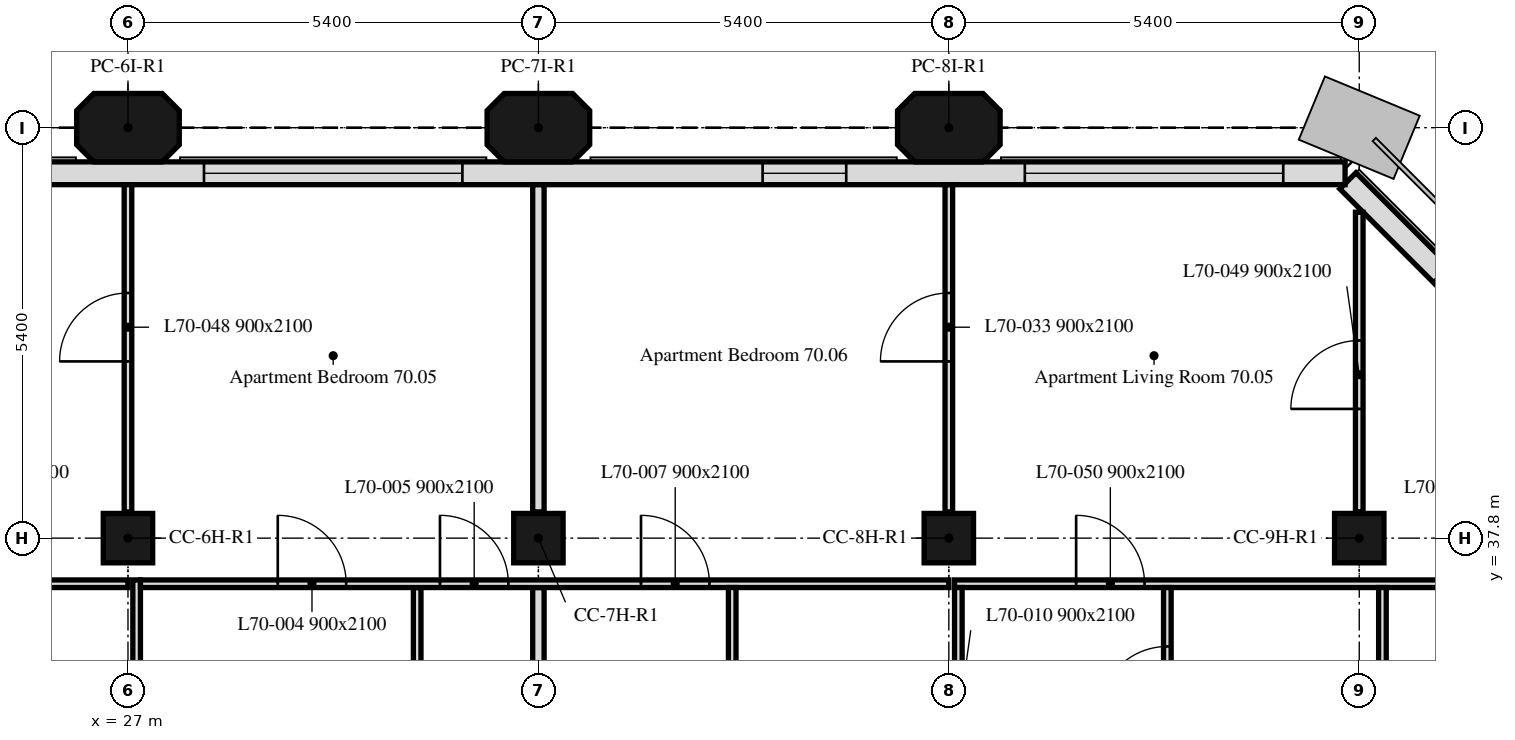
"""IFC4 building model, lengths in metres.
Left out: names, types, materials, properties, quantities, classifications, styles, units other than length and angle.
Written with IfcOpenShell. Run it as: python <this file> out.ifc"""

import sys

from ifc_helpers import new_model, si_unit, direction, frame, frame_2d, origin, origin_2d, place, context, subcontext, project, spatial, polyline, rectangle, outline, extrude, element, fill, save


model = new_model("IFC4")
c1 = context("Model", 3, precision=1e-05, world=origin(), true_north=direction((0.0, 1.0)))
c2 = subcontext(c1, "Body", "Model", "MODEL_VIEW")
j1 = project(units=[si_unit("LENGTHUNIT", "METRE"), si_unit("PLANEANGLEUNIT", "RADIAN")], contexts=[c1])
p1 = place(None, origin())
s1 = spatial("IfcSite", under=j1, at=p1, CompositionType="ELEMENT")
p2 = place(p1, origin())
s2 = spatial("IfcBuilding", under=s1, at=p2, CompositionType="ELEMENT")
p3 = place(p2, frame((0.0, 0.0, 285.1)))
s3 = spatial("IfcBuildingStorey", under=s2, at=p3, CompositionType="ELEMENT", Elevation=285.1)
for number, where, z_axis, x_axis in (
    (1, (27.0, 37.8, 0.0), (0.0, 0.0, 1.0), (1.0, 0.0, 0.0)),
    (2, (32.4, 37.8, 0.0), (0.0, 0.0, 1.0), (1.0, 0.0, 0.0)),
    (3, (37.8, 37.8, 0.0), (0.0, 0.0, 1.0), (1.0, 0.0, 0.0)),
    (4, (43.2, 37.8, 0.0), (0.0, 0.0, 1.0), (1.0, 0.0, 0.0)),
):
    element("IfcColumn", number, at=place(p3, frame(where, z_axis=z_axis, x_axis=x_axis)), inside=s3, PredefinedType="COLUMN", context=c2, shape_type="SweptSolid", body=[
        extrude(rectangle(XDim=0.65, YDim=0.65, at=origin_2d()), origin(), (0.0, 0.0, 1.0), 3.0),
    ])
for number, where, z_axis, x_axis in (
    (5, (27.0, 43.2, 0.0), (0.0, 0.0, 1.0), (1.0, 0.0, 0.0)),
    (6, (32.4, 43.2, 0.0), (0.0, 0.0, 1.0), (1.0, 0.0, 0.0)),
    (7, (37.8, 43.2, 0.0), (0.0, 0.0, 1.0), (1.0, 0.0, 0.0)),
):
    element("IfcColumn", number, at=place(p3, frame(where, z_axis=z_axis, x_axis=x_axis)), inside=s3, PredefinedType="COLUMN", context=c2, shape_type="SweptSolid", body=[
        extrude(outline(polyline([(-0.45, -0.45), (0.45, -0.45), (0.675, -0.225), (0.675, 0.225), (0.45, 0.45), (-0.45, 0.45), (-0.675, 0.225), (-0.675, -0.225), (-0.45, -0.45)])), origin(), (0.0, 0.0, 1.0), 3.0),
    ])
p4 = place(p3, frame((47.901, 37.65, 0.0), z_axis=(0.0, 0.0, 1.0), x_axis=(-0.707106781187, 0.707106781187, 0.0)))
e8 = element("IfcWall", 8, at=p4, inside=s3, PredefinedType="SOLIDWALL", context=c2, shape_type="SweptSolid", body=[
    extrude(rectangle(XDim=6.86, YDim=0.3, at=frame_2d((3.43, 0.0))), origin(), (0.0, 0.0, 1.0), 3.0),
])
p5 = place(p4, frame((1.73, 0.0, 0.9)))
e9 = element("IfcOpeningElement", 9, at=p5, cuts=e8, PredefinedType="OPENING", context=c2, shape_type="SweptSolid", body=[
    extrude(rectangle(XDim=3.4, YDim=1.7, at=frame_2d((1.7, 0.85))), frame((0.0, 0.16, 0.0), z_axis=(0.0, -1.0, 0.0), x_axis=(1.0, 0.0, 0.0)), (0.0, 0.0, 1.0), 0.32),
])
p6 = place(p3, frame((43.014, 42.6, 0.0), z_axis=(0.0, 0.0, 1.0), x_axis=(-1.0, 0.0, 0.0)))
e10 = element("IfcWall", 10, at=p6, inside=s3, PredefinedType="SOLIDWALL", context=c2, shape_type="SweptSolid", body=[
    extrude(rectangle(XDim=32.027, YDim=0.3, at=frame_2d((16.014, 0.0))), origin(), (0.0, 0.0, 1.0), 3.0),
])
p7 = place(p6, frame((0.814, 0.0, 0.9)))
e11 = element("IfcOpeningElement", 11, at=p7, cuts=e10, PredefinedType="OPENING", context=c2, shape_type="SweptSolid", body=[
    extrude(rectangle(XDim=3.4, YDim=1.7, at=frame_2d((1.7, 0.85))), frame((0.0, 0.16, 0.0), z_axis=(0.0, -1.0, 0.0), x_axis=(1.0, 0.0, 0.0)), (0.0, 0.0, 1.0), 0.32),
])
p8 = place(p6, frame((6.564, 0.0, 0.9)))
e12 = element("IfcOpeningElement", 12, at=p8, cuts=e10, PredefinedType="OPENING", context=c2, shape_type="SweptSolid", body=[
    extrude(rectangle(XDim=1.1, YDim=1.7, at=frame_2d((0.55, 0.85))), frame((0.0, 0.16, 0.0), z_axis=(0.0, -1.0, 0.0), x_axis=(1.0, 0.0, 0.0)), (0.0, 0.0, 1.0), 0.32),
])
p9 = place(p6, frame((11.614, 0.0, 0.9)))
e13 = element("IfcOpeningElement", 13, at=p9, cuts=e10, PredefinedType="OPENING", context=c2, shape_type="SweptSolid", body=[
    extrude(rectangle(XDim=3.4, YDim=1.7, at=frame_2d((1.7, 0.85))), frame((0.0, 0.16, 0.0), z_axis=(0.0, -1.0, 0.0), x_axis=(1.0, 0.0, 0.0)), (0.0, 0.0, 1.0), 0.32),
])
p10 = place(p6, frame((17.364, 0.0, 0.9)))
e14 = element("IfcOpeningElement", 14, at=p10, cuts=e10, PredefinedType="OPENING", context=c2, shape_type="SweptSolid", body=[
    extrude(rectangle(XDim=1.1, YDim=1.7, at=frame_2d((0.55, 0.85))), frame((0.0, 0.16, 0.0), z_axis=(0.0, -1.0, 0.0), x_axis=(1.0, 0.0, 0.0)), (0.0, 0.0, 1.0), 0.32),
])
p11 = place(p6, frame((22.414, 0.0, 0.9)))
e15 = element("IfcOpeningElement", 15, at=p11, cuts=e10, PredefinedType="OPENING", context=c2, shape_type="SweptSolid", body=[
    extrude(rectangle(XDim=3.4, YDim=1.7, at=frame_2d((1.7, 0.85))), frame((0.0, 0.16, 0.0), z_axis=(0.0, -1.0, 0.0), x_axis=(1.0, 0.0, 0.0)), (0.0, 0.0, 1.0), 0.32),
])
p12 = place(p6, frame((28.164, 0.0, 0.9)))
e16 = element("IfcOpeningElement", 16, at=p12, cuts=e10, PredefinedType="OPENING", context=c2, shape_type="SweptSolid", body=[
    extrude(rectangle(XDim=1.1, YDim=1.7, at=frame_2d((0.55, 0.85))), frame((0.0, 0.16, 0.0), z_axis=(0.0, -1.0, 0.0), x_axis=(1.0, 0.0, 0.0)), (0.0, 0.0, 1.0), 0.32),
])
p13 = place(p3, frame((10.8, 37.2, 0.0), z_axis=(0.0, 0.0, 1.0), x_axis=(1.0, 0.0, 0.0)))
e17 = element("IfcWall", 17, at=p13, inside=s3, PredefinedType="PARTITIONING", context=c2, shape_type="SweptSolid", body=[
    extrude(rectangle(XDim=16.2, YDim=0.1, at=frame_2d((8.1, 0.0))), origin(), (0.0, 0.0, 1.0), 2.4),
])
p14 = place(p13, frame((2.995, 0.0, 0.0)))
e18 = element("IfcOpeningElement", 18, at=p14, cuts=e17, PredefinedType="OPENING", context=c2, shape_type="SweptSolid", body=[
    extrude(rectangle(XDim=0.9, YDim=2.1, at=frame_2d((0.45, 1.05))), frame((0.0, 0.05, 0.0), z_axis=(0.0, -1.0, 0.0), x_axis=(1.0, 0.0, 0.0)), (0.0, 0.0, 1.0), 0.1),
])
p15 = place(p13, frame((13.996, 0.0, 0.0)))
e19 = element("IfcOpeningElement", 19, at=p15, cuts=e17, PredefinedType="OPENING", context=c2, shape_type="SweptSolid", body=[
    extrude(rectangle(XDim=0.9, YDim=2.1, at=frame_2d((0.45, 1.05))), frame((0.0, 0.05, 0.0), z_axis=(0.0, -1.0, 0.0), x_axis=(1.0, 0.0, 0.0)), (0.0, 0.0, 1.0), 0.1),
])
p16 = place(p13, frame((6.928, 0.0, 0.0)))
e20 = element("IfcOpeningElement", 20, at=p16, cuts=e17, PredefinedType="OPENING", context=c2, shape_type="SweptSolid", body=[
    extrude(rectangle(XDim=0.9, YDim=2.1, at=frame_2d((0.45, 1.05))), frame((0.0, 0.05, 0.0), z_axis=(0.0, -1.0, 0.0), x_axis=(1.0, 0.0, 0.0)), (0.0, 0.0, 1.0), 0.1),
])
p17 = place(p13, frame((8.428, 0.0, 0.0)))
e21 = element("IfcOpeningElement", 21, at=p17, cuts=e17, PredefinedType="OPENING", context=c2, shape_type="SweptSolid", body=[
    extrude(rectangle(XDim=0.9, YDim=2.1, at=frame_2d((0.45, 1.05))), frame((0.0, 0.05, 0.0), z_axis=(0.0, -1.0, 0.0), x_axis=(1.0, 0.0, 0.0)), (0.0, 0.0, 1.0), 0.1),
])
p18 = place(p3, frame((27.0, 38.145, 0.0), z_axis=(0.0, 0.0, 1.0), x_axis=(0.0, 1.0, 0.0)))
e22 = element("IfcWall", 22, at=p18, inside=s3, PredefinedType="PARTITIONING", context=c2, shape_type="SweptSolid", body=[
    extrude(rectangle(XDim=4.304, YDim=0.1, at=frame_2d((2.152, 0.0))), origin(), (0.0, 0.0, 1.0), 2.4),
])
p19 = place(p18, frame((1.98, 0.0, 0.0)))
e23 = element("IfcOpeningElement", 23, at=p19, cuts=e22, PredefinedType="OPENING", context=c2, shape_type="SweptSolid", body=[
    extrude(rectangle(XDim=0.9, YDim=2.1, at=frame_2d((0.45, 1.05))), frame((0.0, 0.05, 0.0), z_axis=(0.0, -1.0, 0.0), x_axis=(1.0, 0.0, 0.0)), (0.0, 0.0, 1.0), 0.1),
])
p20 = place(p3, frame((32.4, 38.145, 0.0), z_axis=(0.0, 0.0, 1.0), x_axis=(0.0, 1.0, 0.0)))
e24 = element("IfcWall", 24, at=p20, inside=s3, PredefinedType="PARTITIONING", context=c2, shape_type="SweptSolid", body=[
    extrude(rectangle(XDim=4.304, YDim=0.15, at=frame_2d((2.152, 0.0))), origin(), (0.0, 0.0, 1.0), 2.4),
])
p21 = place(p3, frame((27.114, 34.725, 0.0), z_axis=(0.0, 0.0, 1.0), x_axis=(0.0, 1.0, 0.0)))
e25 = element("IfcWall", 25, at=p21, inside=s3, PredefinedType="PARTITIONING", context=c2, shape_type="SweptSolid", body=[
    extrude(rectangle(XDim=2.525, YDim=0.1, at=frame_2d((1.262, 0.0))), origin(), (0.0, 0.0, 1.0), 2.4),
])
p22 = place(p3, frame((30.805, 34.725, 0.0), z_axis=(0.0, 0.0, 1.0), x_axis=(0.0, 1.0, 0.0)))
e26 = element("IfcWall", 26, at=p22, inside=s3, PredefinedType="PARTITIONING", context=c2, shape_type="SweptSolid", body=[
    extrude(rectangle(XDim=2.425, YDim=0.1, at=frame_2d((1.212, 0.0))), origin(), (0.0, 0.0, 1.0), 3.0),
])
p23 = place(p3, frame((32.4, 34.725, 0.0), z_axis=(0.0, 0.0, 1.0), x_axis=(0.0, 1.0, 0.0)))
e27 = element("IfcWall", 27, at=p23, inside=s3, PredefinedType="PARTITIONING", context=c2, shape_type="SweptSolid", body=[
    extrude(rectangle(XDim=2.425, YDim=0.15, at=frame_2d((1.212, 0.0))), origin(), (0.0, 0.0, 1.0), 2.4),
])
p24 = place(p3, frame((27.164, 37.2, 0.0), z_axis=(0.0, 0.0, 1.0), x_axis=(1.0, 0.0, 0.0)))
e28 = element("IfcWall", 28, at=p24, inside=s3, PredefinedType="PARTITIONING", context=c2, shape_type="SweptSolid", body=[
    extrude(rectangle(XDim=10.636, YDim=0.1, at=frame_2d((5.318, 0.0))), origin(), (0.0, 0.0, 1.0), 2.4),
])
p25 = place(p24, frame((1.807, 0.0, 0.0)))
e29 = element("IfcOpeningElement", 29, at=p25, cuts=e28, PredefinedType="OPENING", context=c2, shape_type="SweptSolid", body=[
    extrude(rectangle(XDim=0.9, YDim=2.1, at=frame_2d((0.45, 1.05))), frame((0.0, 0.05, 0.0), z_axis=(0.0, -1.0, 0.0), x_axis=(1.0, 0.0, 0.0)), (0.0, 0.0, 1.0), 0.1),
])
p26 = place(p24, frame((3.941, 0.0, 0.0)))
e30 = element("IfcOpeningElement", 30, at=p26, cuts=e28, PredefinedType="OPENING", context=c2, shape_type="SweptSolid", body=[
    extrude(rectangle(XDim=0.9, YDim=2.1, at=frame_2d((0.45, 1.05))), frame((0.0, 0.05, 0.0), z_axis=(0.0, -1.0, 0.0), x_axis=(1.0, 0.0, 0.0)), (0.0, 0.0, 1.0), 0.1),
])
p27 = place(p24, frame((6.586, 0.0, 0.0)))
e31 = element("IfcOpeningElement", 31, at=p27, cuts=e28, PredefinedType="OPENING", context=c2, shape_type="SweptSolid", body=[
    extrude(rectangle(XDim=0.9, YDim=2.1, at=frame_2d((0.45, 1.05))), frame((0.0, 0.05, 0.0), z_axis=(0.0, -1.0, 0.0), x_axis=(1.0, 0.0, 0.0)), (0.0, 0.0, 1.0), 0.1),
])
p28 = place(p3, frame((37.8, 38.145, 0.0), z_axis=(0.0, 0.0, 1.0), x_axis=(0.0, 1.0, 0.0)))
e32 = element("IfcWall", 32, at=p28, inside=s3, PredefinedType="PARTITIONING", context=c2, shape_type="SweptSolid", body=[
    extrude(rectangle(XDim=4.304, YDim=0.1, at=frame_2d((2.152, 0.0))), origin(), (0.0, 0.0, 1.0), 2.4),
])
p29 = place(p28, frame((1.98, 0.0, 0.0)))
e33 = element("IfcOpeningElement", 33, at=p29, cuts=e32, PredefinedType="OPENING", context=c2, shape_type="SweptSolid", body=[
    extrude(rectangle(XDim=0.9, YDim=2.1, at=frame_2d((0.45, 1.05))), frame((0.0, 0.05, 0.0), z_axis=(0.0, -1.0, 0.0), x_axis=(1.0, 0.0, 0.0)), (0.0, 0.0, 1.0), 0.1),
])
p30 = place(p3, frame((43.2, 38.145, 0.0), z_axis=(0.0, 0.0, 1.0), x_axis=(0.0, 1.0, 0.0)))
e34 = element("IfcWall", 34, at=p30, inside=s3, PredefinedType="PARTITIONING", context=c2, shape_type="SweptSolid", body=[
    extrude(rectangle(XDim=3.943, YDim=0.1, at=frame_2d((1.971, 0.0))), origin(), (0.0, 0.0, 1.0), 3.0),
])
p31 = place(p30, frame((1.355, 0.0, 0.0)))
e35 = element("IfcOpeningElement", 35, at=p31, cuts=e34, PredefinedType="OPENING", context=c2, shape_type="SweptSolid", body=[
    extrude(rectangle(XDim=0.9, YDim=2.1, at=frame_2d((0.45, 1.05))), frame((0.0, 0.05, 0.0), z_axis=(0.0, -1.0, 0.0), x_axis=(1.0, 0.0, 0.0)), (0.0, 0.0, 1.0), 0.1),
])
p32 = place(p3, frame((37.875, 37.2, 0.0), z_axis=(0.0, 0.0, 1.0), x_axis=(1.0, 0.0, 0.0)))
e36 = element("IfcWall", 36, at=p32, inside=s3, PredefinedType="PARTITIONING", context=c2, shape_type="SweptSolid", body=[
    extrude(rectangle(XDim=9.974, YDim=0.1, at=frame_2d((4.987, 0.0))), origin(), (0.0, 0.0, 1.0), 3.0),
])
p33 = place(p32, frame((7.165, 0.0, 0.0)))
e37 = element("IfcOpeningElement", 37, at=p33, cuts=e36, PredefinedType="OPENING", context=c2, shape_type="SweptSolid", body=[
    extrude(rectangle(XDim=0.9, YDim=2.1, at=frame_2d((0.45, 1.05))), frame((0.0, 0.05, 0.0), z_axis=(0.0, -1.0, 0.0), x_axis=(1.0, 0.0, 0.0)), (0.0, 0.0, 1.0), 0.1),
])
p34 = place(p32, frame((8.824, 0.0, 0.0)))
e38 = element("IfcOpeningElement", 38, at=p34, cuts=e36, PredefinedType="OPENING", context=c2, shape_type="SweptSolid", body=[
    extrude(rectangle(XDim=0.9, YDim=2.1, at=frame_2d((0.45, 1.05))), frame((0.0, 0.05, 0.0), z_axis=(0.0, -1.0, 0.0), x_axis=(1.0, 0.0, 0.0)), (0.0, 0.0, 1.0), 0.1),
])
p35 = place(p32, frame((1.6, 0.0, 0.0)))
e39 = element("IfcOpeningElement", 39, at=p35, cuts=e36, PredefinedType="OPENING", context=c2, shape_type="SweptSolid", body=[
    extrude(rectangle(XDim=0.9, YDim=2.1, at=frame_2d((0.45, 1.05))), frame((0.0, 0.05, 0.0), z_axis=(0.0, -1.0, 0.0), x_axis=(1.0, 0.0, 0.0)), (0.0, 0.0, 1.0), 0.1),
])
p36 = place(p3, frame((34.95, 34.725, 0.0), z_axis=(0.0, 0.0, 1.0), x_axis=(0.0, 1.0, 0.0)))
e40 = element("IfcWall", 40, at=p36, inside=s3, PredefinedType="PARTITIONING", context=c2, shape_type="SweptSolid", body=[
    extrude(rectangle(XDim=2.425, YDim=0.1, at=frame_2d((1.212, 0.0))), origin(), (0.0, 0.0, 1.0), 3.0),
])
p37 = place(p3, frame((37.925, 34.725, 0.0), z_axis=(0.0, 0.0, 1.0), x_axis=(0.0, 1.0, 0.0)))
e41 = element("IfcWall", 41, at=p37, inside=s3, PredefinedType="PARTITIONING", context=c2, shape_type="SweptSolid", body=[
    extrude(rectangle(XDim=2.425, YDim=0.1, at=frame_2d((1.212, 0.0))), origin(), (0.0, 0.0, 1.0), 2.4),
])
p38 = place(p37, frame((0.25, 0.0, 0.0)))
e42 = element("IfcOpeningElement", 42, at=p38, cuts=e41, PredefinedType="OPENING", context=c2, shape_type="SweptSolid", body=[
    extrude(rectangle(XDim=0.9, YDim=2.1, at=frame_2d((0.45, 1.05))), frame((0.0, 0.05, 0.0), z_axis=(0.0, -1.0, 0.0), x_axis=(1.0, 0.0, 0.0)), (0.0, 0.0, 1.0), 0.1),
])
p39 = place(p3, frame((40.675, 34.725, 0.0), z_axis=(0.0, 0.0, 1.0), x_axis=(0.0, 1.0, 0.0)))
e43 = element("IfcWall", 43, at=p39, inside=s3, PredefinedType="PARTITIONING", context=c2, shape_type="SweptSolid", body=[
    extrude(rectangle(XDim=2.425, YDim=0.1, at=frame_2d((1.212, 0.0))), origin(), (0.0, 0.0, 1.0), 3.0),
])
p40 = place(p39, frame((0.75, 0.0, 0.0)))
e44 = element("IfcOpeningElement", 44, at=p40, cuts=e43, PredefinedType="OPENING", context=c2, shape_type="SweptSolid", body=[
    extrude(rectangle(XDim=0.9, YDim=2.1, at=frame_2d((0.45, 1.05))), frame((0.0, 0.05, 0.0), z_axis=(0.0, -1.0, 0.0), x_axis=(1.0, 0.0, 0.0)), (0.0, 0.0, 1.0), 0.1),
])
p41 = place(p3, frame((43.505, 34.725, 0.0), z_axis=(0.0, 0.0, 1.0), x_axis=(0.0, 1.0, 0.0)))
e45 = element("IfcWall", 45, at=p41, inside=s3, PredefinedType="PARTITIONING", context=c2, shape_type="SweptSolid", body=[
    extrude(rectangle(XDim=2.425, YDim=0.1, at=frame_2d((1.212, 0.0))), origin(), (0.0, 0.0, 1.0), 3.0),
])
p42 = place(p7, origin())
e46 = element("IfcWindow", 46, at=p42, inside=s3, PartitioningType="SINGLE_PANEL", PredefinedType="WINDOW", context=c2, shape_type="SweptSolid", body=[
    extrude(rectangle(XDim=3.4, YDim=1.7, at=frame_2d((1.7, 0.85))), frame((0.0, 0.03, 0.0), z_axis=(0.0, -1.0, 0.0), x_axis=(1.0, 0.0, 0.0)), (0.0, 0.0, 1.0), 0.06),
])
fill(e11, e46)
p43 = place(p8, origin())
e47 = element("IfcWindow", 47, at=p43, inside=s3, PartitioningType="SINGLE_PANEL", PredefinedType="WINDOW", context=c2, shape_type="SweptSolid", body=[
    extrude(rectangle(XDim=1.1, YDim=1.7, at=frame_2d((0.55, 0.85))), frame((0.0, 0.03, 0.0), z_axis=(0.0, -1.0, 0.0), x_axis=(1.0, 0.0, 0.0)), (0.0, 0.0, 1.0), 0.06),
])
fill(e12, e47)
p44 = place(p9, origin())
e48 = element("IfcWindow", 48, at=p44, inside=s3, PartitioningType="SINGLE_PANEL", PredefinedType="WINDOW", context=c2, shape_type="SweptSolid", body=[
    extrude(rectangle(XDim=3.4, YDim=1.7, at=frame_2d((1.7, 0.85))), frame((0.0, 0.03, 0.0), z_axis=(0.0, -1.0, 0.0), x_axis=(1.0, 0.0, 0.0)), (0.0, 0.0, 1.0), 0.06),
])
fill(e13, e48)
p45 = place(p25, origin())
e49 = element("IfcDoor", 49, at=p45, inside=s3, OperationType="SINGLE_SWING_LEFT", PredefinedType="DOOR", context=c2, shape_type="SweptSolid", body=[
    extrude(rectangle(XDim=0.9, YDim=2.1, at=frame_2d((0.45, 1.05))), frame((0.0, 0.025, 0.0), z_axis=(0.0, -1.0, 0.0), x_axis=(1.0, 0.0, 0.0)), (0.0, 0.0, 1.0), 0.05),
])
fill(e29, e49)
p46 = place(p26, origin())
e50 = element("IfcDoor", 50, at=p46, inside=s3, OperationType="SINGLE_SWING_RIGHT", PredefinedType="DOOR", context=c2, shape_type="SweptSolid", body=[
    extrude(rectangle(XDim=0.9, YDim=2.1, at=frame_2d((0.45, 1.05))), frame((0.0, 0.025, 0.0), z_axis=(0.0, -1.0, 0.0), x_axis=(1.0, 0.0, 0.0)), (0.0, 0.0, 1.0), 0.05),
])
fill(e30, e50)
p47 = place(p27, origin())
e51 = element("IfcDoor", 51, at=p47, inside=s3, OperationType="SINGLE_SWING_LEFT", PredefinedType="DOOR", context=c2, shape_type="SweptSolid", body=[
    extrude(rectangle(XDim=0.9, YDim=2.1, at=frame_2d((0.45, 1.05))), frame((0.0, 0.025, 0.0), z_axis=(0.0, -1.0, 0.0), x_axis=(1.0, 0.0, 0.0)), (0.0, 0.0, 1.0), 0.05),
])
fill(e31, e51)
p48 = place(p40, origin())
e52 = element("IfcDoor", 52, at=p48, inside=s3, OperationType="SINGLE_SWING_LEFT", PredefinedType="DOOR", context=c2, shape_type="SweptSolid", body=[
    extrude(rectangle(XDim=0.9, YDim=2.1, at=frame_2d((0.45, 1.05))), frame((0.0, 0.025, 0.0), z_axis=(0.0, -1.0, 0.0), x_axis=(1.0, 0.0, 0.0)), (0.0, 0.0, 1.0), 0.05),
])
fill(e44, e52)
p49 = place(p29, origin())
e53 = element("IfcDoor", 53, at=p49, inside=s3, OperationType="SINGLE_SWING_RIGHT", PredefinedType="DOOR", context=c2, shape_type="SweptSolid", body=[
    extrude(rectangle(XDim=0.9, YDim=2.1, at=frame_2d((0.45, 1.05))), frame((0.0, 0.025, 0.0), z_axis=(0.0, -1.0, 0.0), x_axis=(1.0, 0.0, 0.0)), (0.0, 0.0, 1.0), 0.05),
])
fill(e33, e53)
p50 = place(p19, origin())
e54 = element("IfcDoor", 54, at=p50, inside=s3, OperationType="SINGLE_SWING_LEFT", PredefinedType="DOOR", context=c2, shape_type="SweptSolid", body=[
    extrude(rectangle(XDim=0.9, YDim=2.1, at=frame_2d((0.45, 1.05))), frame((0.0, 0.025, 0.0), z_axis=(0.0, -1.0, 0.0), x_axis=(1.0, 0.0, 0.0)), (0.0, 0.0, 1.0), 0.05),
])
fill(e23, e54)
p51 = place(p31, origin())
e55 = element("IfcDoor", 55, at=p51, inside=s3, OperationType="SINGLE_SWING_LEFT", PredefinedType="DOOR", context=c2, shape_type="SweptSolid", body=[
    extrude(rectangle(XDim=0.9, YDim=2.1, at=frame_2d((0.45, 1.05))), frame((0.0, 0.025, 0.0), z_axis=(0.0, -1.0, 0.0), x_axis=(1.0, 0.0, 0.0)), (0.0, 0.0, 1.0), 0.05),
])
fill(e35, e55)
p52 = place(p35, origin())
e56 = element("IfcDoor", 56, at=p52, inside=s3, OperationType="SINGLE_SWING_LEFT", PredefinedType="DOOR", context=c2, shape_type="SweptSolid", body=[
    extrude(rectangle(XDim=0.9, YDim=2.1, at=frame_2d((0.45, 1.05))), frame((0.0, 0.025, 0.0), z_axis=(0.0, -1.0, 0.0), x_axis=(1.0, 0.0, 0.0)), (0.0, 0.0, 1.0), 0.05),
])
fill(e39, e56)
save(model, sys.argv[1])
